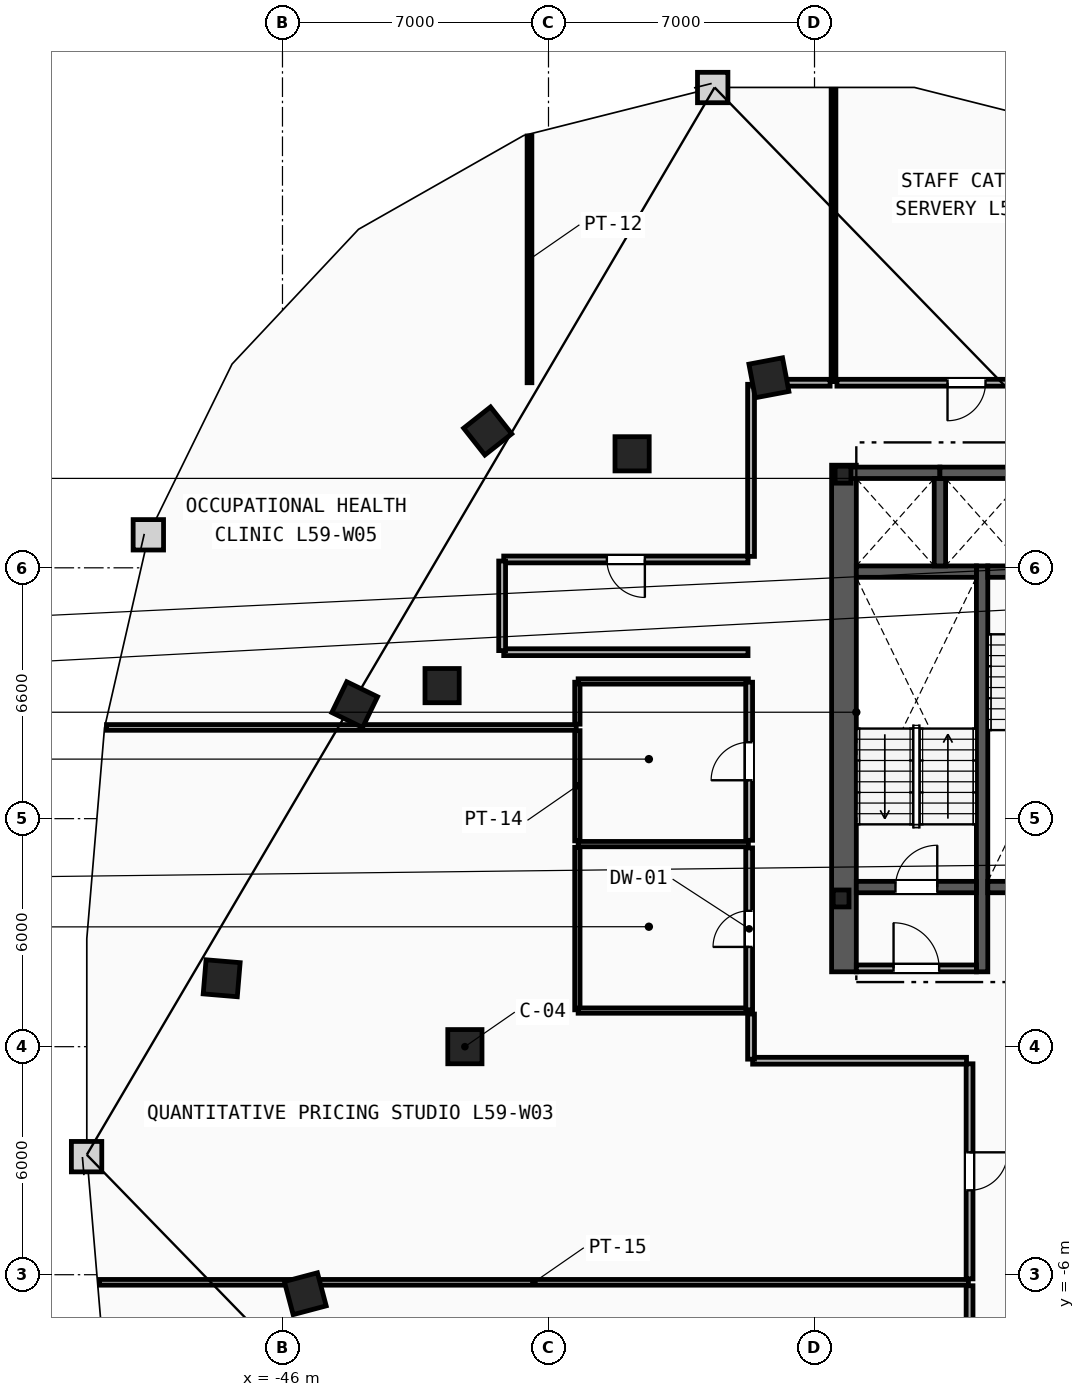
"""IFC4 building model, lengths in metres.
Left out: names, types, materials, properties, quantities, classifications, styles, units other than length and angle.
Written with IfcOpenShell. Run it as: python <this file> out.ifc"""

import sys

from ifc_helpers import new_model, si_unit, direction, frame, frame_2d, origin, origin_2d, place, context, subcontext, project, spatial, rectangle, i_section, extrude, element, fill, save


model = new_model("IFC4")
c1 = context("Model", 3, precision=1e-05, world=origin(), true_north=direction((0.0, 1.0)))
c2 = subcontext(c1, "Body", "Model", "MODEL_VIEW")
j1 = project(units=[si_unit("LENGTHUNIT", "METRE"), si_unit("PLANEANGLEUNIT", "RADIAN")], contexts=[c1])
p1 = place(None, origin())
s1 = spatial("IfcSite", under=j1, at=p1, CompositionType="ELEMENT")
p2 = place(p1, origin())
s2 = spatial("IfcBuilding", under=s1, at=p2, CompositionType="ELEMENT")
p3 = place(p2, frame((0.0, 0.0, 224.2)))
s3 = spatial("IfcBuildingStorey", under=s2, at=p3, CompositionType="ELEMENT", Elevation=224.2)
for number, where, z_axis, x_axis in (
    (1, (-31.3, 3.9, 0.0), (0.0, 0.0, 1.0), (1.0, 0.0, 0.0)),
    (2, (-31.25, 15.05, 0.0), (0.0, 0.0, 1.0), (1.0, 0.0, 0.0)),
):
    element("IfcColumn", number, at=place(p3, frame(where, z_axis=z_axis, x_axis=x_axis)), inside=s3, PredefinedType="COLUMN", context=c2, shape_type="SweptSolid", body=[
        extrude(i_section(OverallWidth=0.416, OverallDepth=0.446, WebThickness=0.039, FlangeThickness=0.063, FilletRadius=0.018, at=origin_2d()), origin(), (0.0, 0.0, 1.0), 3.6),
    ])
for number, where, z_axis, x_axis in (
    (3, (-41.2, 0.0, 0.0), (0.0, 0.0, 1.0), (1.0, 0.0, 0.0)),
    (4, (-41.8, 9.5, 0.0), (0.0, 0.0, 1.0), (1.0, 0.0, 0.0)),
    (5, (-36.8, 15.6, 0.0), (0.0, 0.0, 1.0), (1.0, 0.0, 0.0)),
    (6, (-33.2, 17.6, 0.0), (0.0, 0.0, 1.0), (-0.983, -0.186, 0.0)),
    (7, (-40.6, 16.2, 0.0), (0.0, 0.0, 1.0), (-0.785, -0.619, 0.0)),
    (8, (-44.1, 9.0, 0.0), (0.0, 0.0, 1.0), (-0.437, -0.899, 0.0)),
    (9, (-47.6, 1.8, 0.0), (0.0, 0.0, 1.0), (-0.084, -0.997, 0.0)),
    (10, (-45.4, -6.5, 0.0), (0.0, 0.0, 1.0), (0.256, -0.967, 0.0)),
):
    element("IfcColumn", number, at=place(p3, frame(where, z_axis=z_axis, x_axis=x_axis)), inside=s3, PredefinedType="COLUMN", context=c2, shape_type="SweptSolid", body=[
        extrude(rectangle(XDim=0.9, YDim=0.9, at=origin_2d()), origin(), (0.0, 0.0, 1.0), 3.6),
    ])
p4 = place(p3, frame((-31.225, 1.97, 0.0), z_axis=(0.0, 0.0, 1.0), x_axis=(0.0, 1.0, 0.0)))
e11 = element("IfcWall", 11, at=p4, inside=s3, PredefinedType="SHEAR", context=c2, shape_type="SweptSolid", body=[
    extrude(rectangle(XDim=13.33, YDim=0.65, at=frame_2d((6.665, 0.0))), origin(), (0.0, 0.0, 1.0), 3.34),
])
p5 = place(p3, frame((-27.59, 1.97, 0.0), z_axis=(0.0, 0.0, 1.0), x_axis=(0.0, 1.0, 0.0)))
e12 = element("IfcWall", 12, at=p5, inside=s3, PredefinedType="SHEAR", context=c2, shape_type="SweptSolid", body=[
    extrude(rectangle(XDim=10.68, YDim=0.3, at=frame_2d((5.34, 0.0))), origin(), (0.0, 0.0, 1.0), 3.34),
])
p6 = place(p3, frame((-30.9, 4.2, 0.0), z_axis=(0.0, 0.0, 1.0), x_axis=(1.0, 0.0, 0.0)))
e13 = element("IfcWall", 13, at=p6, inside=s3, PredefinedType="SHEAR", context=c2, shape_type="SweptSolid", body=[
    extrude(rectangle(XDim=3.16, YDim=0.3, at=frame_2d((1.58, 0.0))), origin(), (0.0, 0.0, 1.0), 3.34),
])
p7 = place(p6, frame((1.03, 0.0, 0.0)))
e14 = element("IfcOpeningElement", 14, at=p7, cuts=e13, PredefinedType="OPENING", context=c2, shape_type="SweptSolid", body=[
    extrude(rectangle(XDim=1.1, YDim=2.15, at=frame_2d((0.55, 1.075))), frame((0.0, 0.16, 0.0), z_axis=(0.0, -1.0, 0.0), x_axis=(1.0, 0.0, 0.0)), (0.0, 0.0, 1.0), 0.32),
])
p8 = place(p3, frame((-30.9, 12.5, 0.0), z_axis=(0.0, 0.0, 1.0), x_axis=(1.0, 0.0, 0.0)))
e15 = element("IfcWall", 15, at=p8, inside=s3, PredefinedType="SHEAR", context=c2, shape_type="SweptSolid", body=[
    extrude(rectangle(XDim=3.16, YDim=0.3, at=frame_2d((1.58, 0.0))), origin(), (0.0, 0.0, 1.0), 3.34),
])
p9 = place(p3, frame((-27.44, 12.5, 0.0), z_axis=(0.0, 0.0, 1.0), x_axis=(1.0, 0.0, 0.0)))
e16 = element("IfcWall", 16, at=p9, inside=s3, PredefinedType="SHEAR", context=c2, shape_type="SweptSolid", body=[
    extrude(rectangle(XDim=3.16, YDim=0.3, at=frame_2d((1.58, 0.0))), origin(), (0.0, 0.0, 1.0), 3.34),
])
p10 = place(p9, frame((1.03, 0.0, 0.0)))
e17 = element("IfcOpeningElement", 17, at=p10, cuts=e16, PredefinedType="OPENING", context=c2, shape_type="SweptSolid", body=[
    extrude(rectangle(XDim=1.1, YDim=2.15, at=frame_2d((0.55, 1.075))), frame((0.0, 0.16, 0.0), z_axis=(0.0, -1.0, 0.0), x_axis=(1.0, 0.0, 0.0)), (0.0, 0.0, 1.0), 0.32),
])
p11 = place(p3, frame((-27.44, 4.2, 0.0), z_axis=(0.0, 0.0, 1.0), x_axis=(1.0, 0.0, 0.0)))
e18 = element("IfcWall", 18, at=p11, inside=s3, PredefinedType="SHEAR", context=c2, shape_type="SweptSolid", body=[
    extrude(rectangle(XDim=3.16, YDim=0.3, at=frame_2d((1.58, 0.0))), origin(), (0.0, 0.0, 1.0), 3.34),
])
p12 = place(p3, frame((-30.9, 2.06, 0.0), z_axis=(0.0, 0.0, 1.0), x_axis=(1.0, 0.0, 0.0)))
e19 = element("IfcWall", 19, at=p12, inside=s3, PredefinedType="PARTITIONING", context=c2, shape_type="SweptSolid", body=[
    extrude(rectangle(XDim=3.16, YDim=0.18, at=frame_2d((1.58, 0.0))), origin(), (0.0, 0.0, 1.0), 3.34),
])
p13 = place(p12, frame((0.98, 0.0, 0.0)))
e20 = element("IfcOpeningElement", 20, at=p13, cuts=e19, PredefinedType="OPENING", context=c2, shape_type="SweptSolid", body=[
    extrude(rectangle(XDim=1.2, YDim=2.15, at=frame_2d((0.6, 1.075))), frame((0.0, 0.1, 0.0), z_axis=(0.0, -1.0, 0.0), x_axis=(1.0, 0.0, 0.0)), (0.0, 0.0, 1.0), 0.2),
])
p14 = place(p3, frame((-31.2, 15.1, 0.0), z_axis=(0.0, 0.0, 1.0), x_axis=(1.0, 0.0, 0.0)))
e21 = element("IfcWall", 21, at=p14, inside=s3, PredefinedType="SHEAR", context=c2, shape_type="SweptSolid", body=[
    extrude(rectangle(XDim=2.5, YDim=0.3, at=frame_2d((1.25, 0.0))), origin(), (0.0, 0.0, 1.0), 3.34),
])
p15 = place(p3, frame((-28.7, 12.65, 0.0), z_axis=(0.0, 0.0, 1.0), x_axis=(0.0, 1.0, 0.0)))
e22 = element("IfcWall", 22, at=p15, inside=s3, PredefinedType="SHEAR", context=c2, shape_type="SweptSolid", body=[
    extrude(rectangle(XDim=2.3, YDim=0.3, at=frame_2d((1.15, 0.0))), origin(), (0.0, 0.0, 1.0), 3.34),
])
p16 = place(p3, frame((-28.7, 15.1, 0.0), z_axis=(0.0, 0.0, 1.0), x_axis=(1.0, 0.0, 0.0)))
e23 = element("IfcWall", 23, at=p16, inside=s3, PredefinedType="SHEAR", context=c2, shape_type="SweptSolid", body=[
    extrude(rectangle(XDim=2.5, YDim=0.3, at=frame_2d((1.25, 0.0))), origin(), (0.0, 0.0, 1.0), 3.34),
])
p17 = place(p3, frame((-38.24, 0.97, 0.0), z_axis=(0.0, 0.0, 1.0), x_axis=(0.0, 1.0, 0.0)))
e24 = element("IfcWall", 24, at=p17, inside=s3, PredefinedType="PARTITIONING", context=c2, shape_type="SweptSolid", body=[
    extrude(rectangle(XDim=4.275, YDim=0.14, at=frame_2d((2.138, 0.0))), origin(), (0.0, 0.0, 1.0), 3.34),
])
p18 = place(p3, frame((-38.24, 5.415, 0.0), z_axis=(0.0, 0.0, 1.0), x_axis=(0.0, 1.0, 0.0)))
e25 = element("IfcWall", 25, at=p18, inside=s3, PredefinedType="PARTITIONING", context=c2, shape_type="SweptSolid", body=[
    extrude(rectangle(XDim=2.9, YDim=0.14, at=frame_2d((1.45, 0.0))), origin(), (0.0, 0.0, 1.0), 3.34),
])
p19 = place(p3, frame((-38.24, 8.485, 0.0), z_axis=(0.0, 0.0, 1.0), x_axis=(0.0, 1.0, 0.0)))
e26 = element("IfcWall", 26, at=p19, inside=s3, PredefinedType="PARTITIONING", context=c2, shape_type="SweptSolid", body=[
    extrude(rectangle(XDim=1.105, YDim=0.14, at=frame_2d((0.552, 0.0))), origin(), (0.0, 0.0, 1.0), 3.34),
])
for number, where, z_axis, x_axis in (
    (27, (-38.22, 0.95, 0.0), (0.0, 0.0, 1.0), (1.0, 0.0, 0.0)),
    (28, (-38.22, 5.33, 0.0), (0.0, 0.0, 1.0), (1.0, 0.0, 0.0)),
    (29, (-38.22, 9.61, 0.0), (0.0, 0.0, 1.0), (1.0, 0.0, 0.0)),
):
    element("IfcWall", number, at=place(p3, frame(where, z_axis=z_axis, x_axis=x_axis)), inside=s3, PredefinedType="PARTITIONING", context=c2, shape_type="SweptSolid", body=[
        extrude(rectangle(XDim=4.48, YDim=0.14, at=frame_2d((2.24, 0.0))), origin(), (0.0, 0.0, 1.0), 3.34),
    ])
p20 = place(p3, frame((-33.72, 0.97, 0.0), z_axis=(0.0, 0.0, 1.0), x_axis=(0.0, 1.0, 0.0)))
e30 = element("IfcWall", 30, at=p20, inside=s3, PredefinedType="PARTITIONING", context=c2, shape_type="SweptSolid", body=[
    extrude(rectangle(XDim=4.26, YDim=0.18, at=frame_2d((2.13, 0.0))), origin(), (0.0, 0.0, 1.0), 3.34),
])
p21 = place(p20, frame((1.655, 0.0, 0.0)))
e31 = element("IfcOpeningElement", 31, at=p21, cuts=e30, PredefinedType="OPENING", context=c2, shape_type="SweptSolid", body=[
    extrude(rectangle(XDim=0.95, YDim=2.1, at=frame_2d((0.475, 1.05))), frame((0.0, 0.1, 0.0), z_axis=(0.0, -1.0, 0.0), x_axis=(1.0, 0.0, 0.0)), (0.0, 0.0, 1.0), 0.2),
])
p22 = place(p3, frame((-33.72, 5.43, 0.0), z_axis=(0.0, 0.0, 1.0), x_axis=(0.0, 1.0, 0.0)))
e32 = element("IfcWall", 32, at=p22, inside=s3, PredefinedType="PARTITIONING", context=c2, shape_type="SweptSolid", body=[
    extrude(rectangle(XDim=4.16, YDim=0.18, at=frame_2d((2.08, 0.0))), origin(), (0.0, 0.0, 1.0), 3.34),
])
p23 = place(p22, frame((1.58, 0.0, 0.0)))
e33 = element("IfcOpeningElement", 33, at=p23, cuts=e32, PredefinedType="OPENING", context=c2, shape_type="SweptSolid", body=[
    extrude(rectangle(XDim=1.0, YDim=2.15, at=frame_2d((0.5, 1.075))), frame((0.0, 0.1, 0.0), z_axis=(0.0, -1.0, 0.0), x_axis=(1.0, 0.0, 0.0)), (0.0, 0.0, 1.0), 0.2),
])
p24 = place(p3, frame((-50.817, -6.2, 0.0), z_axis=(0.0, 0.0, 1.0), x_axis=(1.0, 0.0, 0.0)))
e34 = element("IfcWall", 34, at=p24, inside=s3, PredefinedType="PARTITIONING", context=c2, shape_type="SweptSolid", body=[
    extrude(rectangle(XDim=22.867, YDim=0.15, at=frame_2d((11.434, 0.0))), origin(), (0.0, 0.0, 1.0), 3.34),
])
p25 = place(p3, frame((-50.63, 8.4, 0.0), z_axis=(0.0, 0.0, 1.0), x_axis=(1.0, 0.0, 0.0)))
e35 = element("IfcWall", 35, at=p25, inside=s3, PredefinedType="PARTITIONING", context=c2, shape_type="SweptSolid", body=[
    extrude(rectangle(XDim=12.36, YDim=0.15, at=frame_2d((6.18, 0.0))), origin(), (0.0, 0.0, 1.0), 3.34),
])
p26 = place(p3, frame((-39.5, 17.47, 0.0), z_axis=(0.0, 0.0, 1.0), x_axis=(0.0, 1.0, 0.0)))
e36 = element("IfcWall", 36, at=p26, inside=s3, PredefinedType="PARTITIONING", context=c2, shape_type="SweptSolid", body=[
    extrude(rectangle(XDim=6.493, YDim=0.125, at=frame_2d((3.246, 0.0))), origin(), (0.0, 0.0, 1.0), 3.34),
])
p27 = place(p3, frame((-31.5, 17.5, 0.0), z_axis=(0.0, 0.0, 1.0), x_axis=(0.0, 1.0, 0.0)))
e37 = element("IfcWall", 37, at=p27, inside=s3, PredefinedType="PARTITIONING", context=c2, shape_type="SweptSolid", body=[
    extrude(rectangle(XDim=7.69, YDim=0.125, at=frame_2d((3.845, 0.0))), origin(), (0.0, 0.0, 1.0), 3.34),
])
p28 = place(p3, frame((-27.92, -6.29, 0.0), z_axis=(0.0, 0.0, 1.0), x_axis=(0.0, -1.0, 0.0)))
e38 = element("IfcWall", 38, at=p28, inside=s3, PredefinedType="PARTITIONING", context=c2, shape_type="SweptSolid", body=[
    extrude(rectangle(XDim=4.888, YDim=0.18, at=frame_2d((2.444, 0.0))), origin(), (0.0, 0.0, 1.0), 3.34),
])
p29 = place(p28, frame((1.944, 0.0, 0.0)))
e39 = element("IfcOpeningElement", 39, at=p29, cuts=e38, PredefinedType="OPENING", context=c2, shape_type="SweptSolid", body=[
    extrude(rectangle(XDim=1.0, YDim=2.15, at=frame_2d((0.5, 1.075))), frame((0.0, 0.1, 0.0), z_axis=(0.0, -1.0, 0.0), x_axis=(1.0, 0.0, 0.0)), (0.0, 0.0, 1.0), 0.2),
])
p30 = place(p3, frame((-27.92, -0.45, 0.0), z_axis=(0.0, 0.0, 1.0), x_axis=(0.0, -1.0, 0.0)))
e40 = element("IfcWall", 40, at=p30, inside=s3, PredefinedType="PARTITIONING", context=c2, shape_type="SweptSolid", body=[
    extrude(rectangle(XDim=5.66, YDim=0.18, at=frame_2d((2.83, 0.0))), origin(), (0.0, 0.0, 1.0), 3.34),
])
p31 = place(p30, frame((2.33, 0.0, 0.0)))
e41 = element("IfcOpeningElement", 41, at=p31, cuts=e40, PredefinedType="OPENING", context=c2, shape_type="SweptSolid", body=[
    extrude(rectangle(XDim=1.0, YDim=2.15, at=frame_2d((0.5, 1.075))), frame((0.0, 0.1, 0.0), z_axis=(0.0, -1.0, 0.0), x_axis=(1.0, 0.0, 0.0)), (0.0, 0.0, 1.0), 0.2),
])
p32 = place(p3, frame((-33.628, -0.37, 0.0), z_axis=(0.0, 0.0, 1.0), x_axis=(1.0, 0.0, 0.0)))
e42 = element("IfcWall", 42, at=p32, inside=s3, PredefinedType="PARTITIONING", context=c2, shape_type="SweptSolid", body=[
    extrude(rectangle(XDim=5.628, YDim=0.18, at=frame_2d((2.814, 0.0))), origin(), (0.0, 0.0, 1.0), 3.34),
])
p33 = place(p3, frame((-33.67, 0.859, 0.0), z_axis=(0.0, 0.0, 1.0), x_axis=(0.0, -1.0, 0.0)))
e43 = element("IfcWall", 43, at=p33, inside=s3, PredefinedType="PARTITIONING", context=c2, shape_type="SweptSolid", body=[
    extrude(rectangle(XDim=1.187, YDim=0.18, at=frame_2d((0.594, 0.0))), origin(), (0.0, 0.0, 1.0), 3.34),
])
p34 = place(p3, frame((-33.75, 12.82, 0.0), z_axis=(0.0, 0.0, 1.0), x_axis=(-1.0, 0.0, 0.0)))
e44 = element("IfcWall", 44, at=p34, inside=s3, PredefinedType="PARTITIONING", context=c2, shape_type="SweptSolid", body=[
    extrude(rectangle(XDim=6.428, YDim=0.18, at=frame_2d((3.214, 0.0))), origin(), (0.0, 0.0, 1.0), 3.34),
])
p35 = place(p34, frame((2.714, 0.0, 0.0)))
e45 = element("IfcOpeningElement", 45, at=p35, cuts=e44, PredefinedType="OPENING", context=c2, shape_type="SweptSolid", body=[
    extrude(rectangle(XDim=1.0, YDim=2.15, at=frame_2d((0.5, 1.075))), frame((0.0, 0.1, 0.0), z_axis=(0.0, -1.0, 0.0), x_axis=(1.0, 0.0, 0.0)), (0.0, 0.0, 1.0), 0.2),
])
p36 = place(p3, frame((-40.178, 10.38, 0.0), z_axis=(0.0, 0.0, 1.0), x_axis=(1.0, 0.0, 0.0)))
e46 = element("IfcWall", 46, at=p36, inside=s3, PredefinedType="PARTITIONING", context=c2, shape_type="SweptSolid", body=[
    extrude(rectangle(XDim=6.428, YDim=0.18, at=frame_2d((3.214, 0.0))), origin(), (0.0, 0.0, 1.0), 3.34),
])
p37 = place(p3, frame((-33.67, 17.428, 0.0), z_axis=(0.0, 0.0, 1.0), x_axis=(0.0, -1.0, 0.0)))
e47 = element("IfcWall", 47, at=p37, inside=s3, PredefinedType="PARTITIONING", context=c2, shape_type="SweptSolid", body=[
    extrude(rectangle(XDim=4.529, YDim=0.18, at=frame_2d((2.264, 0.0))), origin(), (0.0, 0.0, 1.0), 3.34),
])
p38 = place(p3, frame((-40.22, 12.779, 0.0), z_axis=(0.0, 0.0, 1.0), x_axis=(0.0, -1.0, 0.0)))
e48 = element("IfcWall", 48, at=p38, inside=s3, PredefinedType="PARTITIONING", context=c2, shape_type="SweptSolid", body=[
    extrude(rectangle(XDim=2.357, YDim=0.18, at=frame_2d((1.179, 0.0))), origin(), (0.0, 0.0, 1.0), 3.34),
])
p39 = place(p3, frame((-31.59, 17.47, 0.0), z_axis=(0.0, 0.0, 1.0), x_axis=(-1.0, 0.0, 0.0)))
e49 = element("IfcWall", 49, at=p39, inside=s3, PredefinedType="PARTITIONING", context=c2, shape_type="SweptSolid", body=[
    extrude(rectangle(XDim=2.038, YDim=0.18, at=frame_2d((1.019, 0.0))), origin(), (0.0, 0.0, 1.0), 3.34),
])
p40 = place(p3, frame((-24.59, 17.47, 0.0), z_axis=(0.0, 0.0, 1.0), x_axis=(-1.0, 0.0, 0.0)))
e50 = element("IfcWall", 50, at=p40, inside=s3, PredefinedType="PARTITIONING", context=c2, shape_type="SweptSolid", body=[
    extrude(rectangle(XDim=6.82, YDim=0.18, at=frame_2d((3.41, 0.0))), origin(), (0.0, 0.0, 1.0), 3.34),
])
p41 = place(p40, frame((2.91, 0.0, 0.0)))
e51 = element("IfcOpeningElement", 51, at=p41, cuts=e50, PredefinedType="OPENING", context=c2, shape_type="SweptSolid", body=[
    extrude(rectangle(XDim=1.0, YDim=2.15, at=frame_2d((0.5, 1.075))), frame((0.0, 0.1, 0.0), z_axis=(0.0, -1.0, 0.0), x_axis=(1.0, 0.0, 0.0)), (0.0, 0.0, 1.0), 0.2),
])
p42 = place(p7, origin())
e52 = element("IfcDoor", 52, at=p42, inside=s3, OperationType="SINGLE_SWING_RIGHT", PredefinedType="DOOR", context=c2, shape_type="SweptSolid", body=[
    extrude(rectangle(XDim=1.1, YDim=2.15, at=frame_2d((0.55, 1.075))), frame((0.0, 0.025, 0.0), z_axis=(0.0, -1.0, 0.0), x_axis=(1.0, 0.0, 0.0)), (0.0, 0.0, 1.0), 0.05),
])
fill(e14, e52)
p43 = place(p13, origin())
e53 = element("IfcDoor", 53, at=p43, inside=s3, OperationType="SINGLE_SWING_LEFT", PredefinedType="DOOR", context=c2, shape_type="SweptSolid", body=[
    extrude(rectangle(XDim=1.2, YDim=2.15, at=frame_2d((0.6, 1.075))), frame((0.0, 0.025, 0.0), z_axis=(0.0, -1.0, 0.0), x_axis=(1.0, 0.0, 0.0)), (0.0, 0.0, 1.0), 0.05),
])
fill(e20, e53)
p44 = place(p41, origin())
e54 = element("IfcDoor", 54, at=p44, inside=s3, OperationType="SINGLE_SWING_RIGHT", PredefinedType="DOOR", context=c2, shape_type="SweptSolid", body=[
    extrude(rectangle(XDim=1.0, YDim=2.15, at=frame_2d((0.5, 1.075))), frame((0.0, 0.025, 0.0), z_axis=(0.0, -1.0, 0.0), x_axis=(1.0, 0.0, 0.0)), (0.0, 0.0, 1.0), 0.05),
])
fill(e51, e54)
p45 = place(p35, origin())
e55 = element("IfcDoor", 55, at=p45, inside=s3, OperationType="SINGLE_SWING_LEFT", PredefinedType="DOOR", context=c2, shape_type="SweptSolid", body=[
    extrude(rectangle(XDim=1.0, YDim=2.15, at=frame_2d((0.5, 1.075))), frame((0.0, 0.025, 0.0), z_axis=(0.0, -1.0, 0.0), x_axis=(1.0, 0.0, 0.0)), (0.0, 0.0, 1.0), 0.05),
])
fill(e45, e55)
p46 = place(p31, origin())
e56 = element("IfcDoor", 56, at=p46, inside=s3, OperationType="SINGLE_SWING_LEFT", PredefinedType="DOOR", context=c2, shape_type="SweptSolid", body=[
    extrude(rectangle(XDim=1.0, YDim=2.15, at=frame_2d((0.5, 1.075))), frame((0.0, 0.025, 0.0), z_axis=(0.0, -1.0, 0.0), x_axis=(1.0, 0.0, 0.0)), (0.0, 0.0, 1.0), 0.05),
])
fill(e41, e56)
p47 = place(p21, origin())
e57 = element("IfcDoor", 57, at=p47, inside=s3, OperationType="SINGLE_SWING_LEFT", PredefinedType="DOOR", context=c2, shape_type="SweptSolid", body=[
    extrude(rectangle(XDim=0.95, YDim=2.1, at=frame_2d((0.475, 1.05))), frame((0.0, 0.025, 0.0), z_axis=(0.0, -1.0, 0.0), x_axis=(1.0, 0.0, 0.0)), (0.0, 0.0, 1.0), 0.05),
])
fill(e31, e57)
p48 = place(p23, origin())
e58 = element("IfcDoor", 58, at=p48, inside=s3, OperationType="SINGLE_SWING_LEFT", PredefinedType="DOOR", context=c2, shape_type="SweptSolid", body=[
    extrude(rectangle(XDim=1.0, YDim=2.15, at=frame_2d((0.5, 1.075))), frame((0.0, 0.025, 0.0), z_axis=(0.0, -1.0, 0.0), x_axis=(1.0, 0.0, 0.0)), (0.0, 0.0, 1.0), 0.05),
])
fill(e33, e58)
save(model, sys.argv[1])
